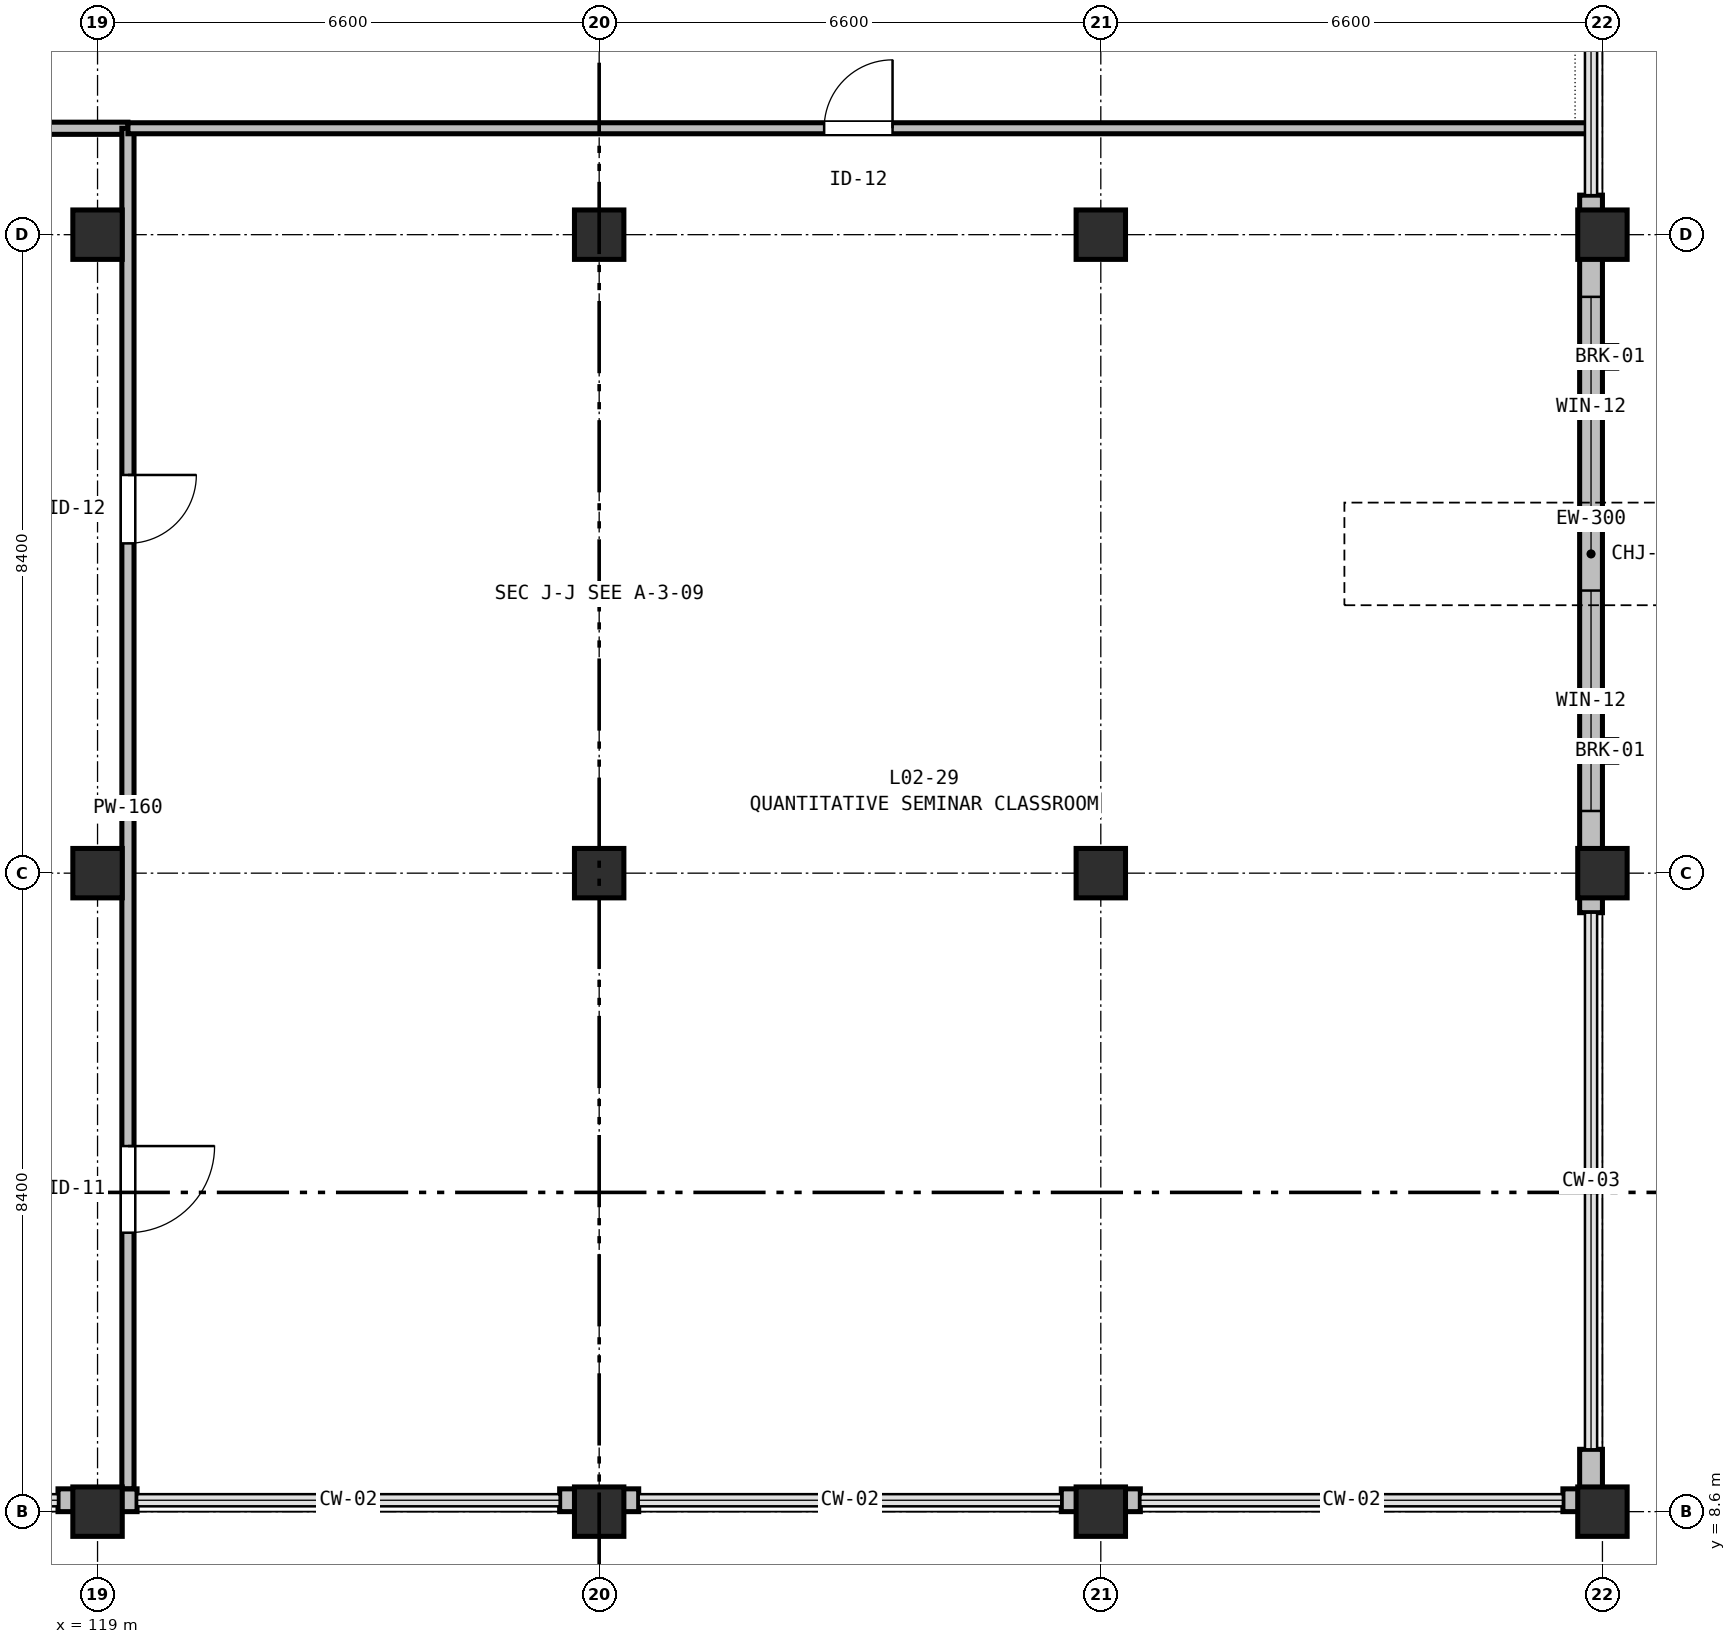
"""IFC4 building model, lengths in metres.
Left out: names, types, materials, properties, quantities, classifications, styles, units other than length and angle.
Written with IfcOpenShell. Run it as: python <this file> out.ifc"""

import sys

from ifc_helpers import new_model, si_unit, direction, frame, frame_2d, origin, origin_2d, place, context, subcontext, project, spatial, rectangle, extrude, element, fill, save


model = new_model("IFC4")
c1 = context("Model", 3, precision=1e-05, world=origin(), true_north=direction((0.0, 1.0)))
c2 = subcontext(c1, "Body", "Model", "MODEL_VIEW")
j1 = project(units=[si_unit("LENGTHUNIT", "METRE"), si_unit("PLANEANGLEUNIT", "RADIAN")], contexts=[c1])
p1 = place(None, origin())
s1 = spatial("IfcSite", under=j1, at=p1, CompositionType="ELEMENT")
p2 = place(p1, origin())
s2 = spatial("IfcBuilding", under=s1, at=p2, CompositionType="ELEMENT")
p3 = place(p2, frame((0.0, 0.0, 10.2)))
s3 = spatial("IfcBuildingStorey", under=s2, at=p3, CompositionType="ELEMENT", Elevation=10.2)
p4 = place(p3, frame((119.0, 8.6, 0.0), z_axis=(0.0, 0.0, 1.0), x_axis=(1.0, 0.0, 0.0)))
e1 = element("IfcColumn", 1, at=p4, inside=s3, PredefinedType="COLUMN", context=c2, shape_type="SweptSolid", body=[
    extrude(rectangle(XDim=0.65, YDim=0.65, at=origin_2d()), origin(), (0.0, 0.0, 1.0), 4.74),
])
for number, where, z_axis, x_axis in (
    (2, (119.0, 17.0, 0.0), (0.0, 0.0, 1.0), (1.0, 0.0, 0.0)),
    (3, (119.0, 25.4, 0.0), (0.0, 0.0, 1.0), (1.0, 0.0, 0.0)),
):
    element("IfcColumn", number, at=place(p3, frame(where, z_axis=z_axis, x_axis=x_axis)), inside=s3, PredefinedType="COLUMN", context=c2, shape_type="SweptSolid", body=[
        extrude(rectangle(XDim=0.65, YDim=0.65, at=origin_2d()), origin(), (0.0, 0.0, 1.0), 4.8),
    ])
p5 = place(p3, frame((125.6, 8.6, 0.0), z_axis=(0.0, 0.0, 1.0), x_axis=(1.0, 0.0, 0.0)))
e4 = element("IfcColumn", 4, at=p5, inside=s3, PredefinedType="COLUMN", context=c2, shape_type="SweptSolid", body=[
    extrude(rectangle(XDim=0.65, YDim=0.65, at=origin_2d()), origin(), (0.0, 0.0, 1.0), 4.74),
])
for number, where, z_axis, x_axis in (
    (5, (125.6, 17.0, 0.0), (0.0, 0.0, 1.0), (1.0, 0.0, 0.0)),
    (6, (125.6, 25.4, 0.0), (0.0, 0.0, 1.0), (1.0, 0.0, 0.0)),
):
    element("IfcColumn", number, at=place(p3, frame(where, z_axis=z_axis, x_axis=x_axis)), inside=s3, PredefinedType="COLUMN", context=c2, shape_type="SweptSolid", body=[
        extrude(rectangle(XDim=0.65, YDim=0.65, at=origin_2d()), origin(), (0.0, 0.0, 1.0), 4.8),
    ])
p6 = place(p3, frame((132.2, 8.6, 0.0), z_axis=(0.0, 0.0, 1.0), x_axis=(1.0, 0.0, 0.0)))
e7 = element("IfcColumn", 7, at=p6, inside=s3, PredefinedType="COLUMN", context=c2, shape_type="SweptSolid", body=[
    extrude(rectangle(XDim=0.65, YDim=0.65, at=origin_2d()), origin(), (0.0, 0.0, 1.0), 4.74),
])
for number, where, z_axis, x_axis in (
    (8, (132.2, 17.0, 0.0), (0.0, 0.0, 1.0), (1.0, 0.0, 0.0)),
    (9, (132.2, 25.4, 0.0), (0.0, 0.0, 1.0), (1.0, 0.0, 0.0)),
):
    element("IfcColumn", number, at=place(p3, frame(where, z_axis=z_axis, x_axis=x_axis)), inside=s3, PredefinedType="COLUMN", context=c2, shape_type="SweptSolid", body=[
        extrude(rectangle(XDim=0.65, YDim=0.65, at=origin_2d()), origin(), (0.0, 0.0, 1.0), 4.8),
    ])
p7 = place(p3, frame((138.8, 8.6, 0.0), z_axis=(0.0, 0.0, 1.0), x_axis=(1.0, 0.0, 0.0)))
e10 = element("IfcColumn", 10, at=p7, inside=s3, PredefinedType="COLUMN", context=c2, shape_type="SweptSolid", body=[
    extrude(rectangle(XDim=0.65, YDim=0.65, at=origin_2d()), origin(), (0.0, 0.0, 1.0), 4.74),
])
for number, where, z_axis, x_axis in (
    (11, (138.8, 17.0, 0.0), (0.0, 0.0, 1.0), (1.0, 0.0, 0.0)),
    (12, (138.8, 25.4, 0.0), (0.0, 0.0, 1.0), (1.0, 0.0, 0.0)),
):
    element("IfcColumn", number, at=place(p3, frame(where, z_axis=z_axis, x_axis=x_axis)), inside=s3, PredefinedType="COLUMN", context=c2, shape_type="SweptSolid", body=[
        extrude(rectangle(XDim=0.65, YDim=0.65, at=origin_2d()), origin(), (0.0, 0.0, 1.0), 4.8),
    ])
p8 = place(p3, frame((138.65, 25.92, 0.0), z_axis=(0.0, 0.0, 1.0), x_axis=(0.0, -1.0, 0.0)))
e13 = element("IfcWall", 13, at=p8, inside=s3, PredefinedType="STANDARD", context=c2, shape_type="SweptSolid", body=[
    extrude(rectangle(XDim=0.52, YDim=0.3, at=frame_2d((0.26, 0.0))), origin(), (0.0, 0.0, 1.0), 3.935),
])
p9 = place(p3, frame((138.65, 25.4, 0.0), z_axis=(0.0, 0.0, 1.0), x_axis=(0.0, -1.0, 0.0)))
e14 = element("IfcWall", 14, at=p9, inside=s3, PredefinedType="STANDARD", context=c2, shape_type="SweptSolid", body=[
    extrude(rectangle(XDim=8.4, YDim=0.3, at=frame_2d((4.2, 0.0))), origin(), (0.0, 0.0, 1.0), 3.935),
])
p10 = place(p9, frame((0.818, 0.0, 0.75)))
e15 = element("IfcOpeningElement", 15, at=p10, cuts=e14, PredefinedType="OPENING", context=c2, shape_type="SweptSolid", body=[
    extrude(rectangle(XDim=2.9, YDim=2.2, at=frame_2d((1.45, 1.1))), frame((0.0, 0.16, 0.0), z_axis=(0.0, -1.0, 0.0), x_axis=(1.0, 0.0, 0.0)), (0.0, 0.0, 1.0), 0.32),
])
p11 = place(p9, frame((4.682, 0.0, 0.75)))
e16 = element("IfcOpeningElement", 16, at=p11, cuts=e14, PredefinedType="OPENING", context=c2, shape_type="SweptSolid", body=[
    extrude(rectangle(XDim=2.9, YDim=2.2, at=frame_2d((1.45, 1.1))), frame((0.0, 0.16, 0.0), z_axis=(0.0, -1.0, 0.0), x_axis=(1.0, 0.0, 0.0)), (0.0, 0.0, 1.0), 0.32),
])
for number, where, z_axis, x_axis in (
    (17, (138.65, 17.0, 0.0), (0.0, 0.0, 1.0), (0.0, -1.0, 0.0)),
    (18, (138.65, 9.42, 0.0), (0.0, 0.0, 1.0), (0.0, -1.0, 0.0)),
    (19, (138.8, 8.75, 0.0), (0.0, 0.0, 1.0), (-1.0, 0.0, 0.0)),
    (20, (132.72, 8.75, 0.0), (0.0, 0.0, 1.0), (-1.0, 0.0, 0.0)),
    (21, (132.2, 8.75, 0.0), (0.0, 0.0, 1.0), (-1.0, 0.0, 0.0)),
    (22, (126.12, 8.75, 0.0), (0.0, 0.0, 1.0), (-1.0, 0.0, 0.0)),
    (23, (125.6, 8.75, 0.0), (0.0, 0.0, 1.0), (-1.0, 0.0, 0.0)),
    (24, (119.52, 8.75, 0.0), (0.0, 0.0, 1.0), (-1.0, 0.0, 0.0)),
    (25, (119.0, 8.75, 0.0), (0.0, 0.0, 1.0), (-1.0, 0.0, 0.0)),
):
    element("IfcWall", number, at=place(p3, frame(where, z_axis=z_axis, x_axis=x_axis)), inside=s3, PredefinedType="STANDARD", context=c2, shape_type="SweptSolid", body=[
        extrude(rectangle(XDim=0.52, YDim=0.3, at=frame_2d((0.26, 0.0))), origin(), (0.0, 0.0, 1.0), 3.935),
    ])
p12 = place(p3, frame((106.102, 26.8, 0.0), z_axis=(0.0, 0.0, 1.0), x_axis=(1.0, 0.0, 0.0)))
e26 = element("IfcWall", 26, at=p12, inside=s3, PredefinedType="PARTITIONING", context=c2, shape_type="SweptSolid", body=[
    extrude(rectangle(XDim=13.298, YDim=0.16, at=frame_2d((6.649, 0.0))), origin(), (0.0, 0.0, 1.0), 3.935),
])
p13 = place(p12, frame((4.603, 0.0, 0.0)))
e27 = element("IfcOpeningElement", 27, at=p13, cuts=e26, PredefinedType="OPENING", context=c2, shape_type="SweptSolid", body=[
    extrude(rectangle(XDim=0.9, YDim=2.02, at=frame_2d((0.45, 1.01))), frame((0.0, 0.09, 0.0), z_axis=(0.0, -1.0, 0.0), x_axis=(1.0, 0.0, 0.0)), (0.0, 0.0, 1.0), 0.18),
])
p14 = place(p3, frame((119.4, 26.8, 0.0), z_axis=(0.0, 0.0, 1.0), x_axis=(0.0, -1.0, 0.0)))
e28 = element("IfcWall", 28, at=p14, inside=s3, PredefinedType="PARTITIONING", context=c2, shape_type="SweptSolid", body=[
    extrude(rectangle(XDim=17.898, YDim=0.16, at=frame_2d((8.949, 0.0))), origin(), (0.0, 0.0, 1.0), 4.035),
])
p15 = place(p14, frame((13.39, 0.0, 0.0)))
e29 = element("IfcOpeningElement", 29, at=p15, cuts=e28, PredefinedType="OPENING", context=c2, shape_type="SweptSolid", body=[
    extrude(rectangle(XDim=1.14, YDim=2.06, at=frame_2d((0.57, 1.03))), frame((0.0, 0.09, 0.0), z_axis=(0.0, -1.0, 0.0), x_axis=(1.0, 0.0, 0.0)), (0.0, 0.0, 1.0), 0.18),
])
p16 = place(p14, frame((4.561, 0.0, 0.0)))
e30 = element("IfcOpeningElement", 30, at=p16, cuts=e28, PredefinedType="OPENING", context=c2, shape_type="SweptSolid", body=[
    extrude(rectangle(XDim=0.9, YDim=2.1, at=frame_2d((0.45, 1.05))), frame((0.0, 0.09, 0.0), z_axis=(0.0, -1.0, 0.0), x_axis=(1.0, 0.0, 0.0)), (0.0, 0.0, 1.0), 0.18),
])
p17 = place(p3, frame((119.4, 26.8, 0.0), z_axis=(0.0, 0.0, 1.0), x_axis=(1.0, 0.0, 0.0)))
e31 = element("IfcWall", 31, at=p17, inside=s3, PredefinedType="PARTITIONING", context=c2, shape_type="SweptSolid", body=[
    extrude(rectangle(XDim=19.22, YDim=0.145, at=frame_2d((9.61, 0.0))), origin(), (0.0, 0.0, 1.0), 3.935),
])
p18 = place(p17, frame((9.16, 0.0, 0.0)))
e32 = element("IfcOpeningElement", 32, at=p18, cuts=e31, PredefinedType="OPENING", context=c2, shape_type="SweptSolid", body=[
    extrude(rectangle(XDim=0.9, YDim=2.1, at=frame_2d((0.45, 1.05))), frame((0.0, 0.083, 0.0), z_axis=(0.0, -1.0, 0.0), x_axis=(1.0, 0.0, 0.0)), (0.0, 0.0, 1.0), 0.165),
])
p19 = place(p10, origin())
e33 = element("IfcWindow", 33, at=p19, inside=s3, PartitioningType="SINGLE_PANEL", PredefinedType="WINDOW", context=c2, shape_type="SweptSolid", body=[
    extrude(rectangle(XDim=2.9, YDim=2.2, at=frame_2d((1.45, 1.1))), frame((0.0, 0.03, 0.0), z_axis=(0.0, -1.0, 0.0), x_axis=(1.0, 0.0, 0.0)), (0.0, 0.0, 1.0), 0.06),
])
fill(e15, e33)
p20 = place(p11, origin())
e34 = element("IfcWindow", 34, at=p20, inside=s3, PartitioningType="SINGLE_PANEL", PredefinedType="WINDOW", context=c2, shape_type="SweptSolid", body=[
    extrude(rectangle(XDim=2.9, YDim=2.2, at=frame_2d((1.45, 1.1))), frame((0.0, 0.03, 0.0), z_axis=(0.0, -1.0, 0.0), x_axis=(1.0, 0.0, 0.0)), (0.0, 0.0, 1.0), 0.06),
])
fill(e16, e34)
p21 = place(p15, origin())
e35 = element("IfcDoor", 35, at=p21, inside=s3, OperationType="SINGLE_SWING_LEFT", PredefinedType="DOOR", context=c2, shape_type="SweptSolid", body=[
    extrude(rectangle(XDim=1.14, YDim=2.06, at=frame_2d((0.57, 1.03))), frame((0.0, 0.025, 0.0), z_axis=(0.0, -1.0, 0.0), x_axis=(1.0, 0.0, 0.0)), (0.0, 0.0, 1.0), 0.05),
])
fill(e29, e35)
p22 = place(p18, origin())
e36 = element("IfcDoor", 36, at=p22, inside=s3, OperationType="SINGLE_SWING_RIGHT", PredefinedType="DOOR", context=c2, shape_type="SweptSolid", body=[
    extrude(rectangle(XDim=0.9, YDim=2.1, at=frame_2d((0.45, 1.05))), frame((0.0, 0.025, 0.0), z_axis=(0.0, -1.0, 0.0), x_axis=(1.0, 0.0, 0.0)), (0.0, 0.0, 1.0), 0.05),
])
fill(e32, e36)
p23 = place(p16, origin())
e37 = element("IfcDoor", 37, at=p23, inside=s3, OperationType="SINGLE_SWING_LEFT", PredefinedType="DOOR", context=c2, shape_type="SweptSolid", body=[
    extrude(rectangle(XDim=0.9, YDim=2.1, at=frame_2d((0.45, 1.05))), frame((0.0, 0.025, 0.0), z_axis=(0.0, -1.0, 0.0), x_axis=(1.0, 0.0, 0.0)), (0.0, 0.0, 1.0), 0.05),
])
fill(e30, e37)
save(model, sys.argv[1])
